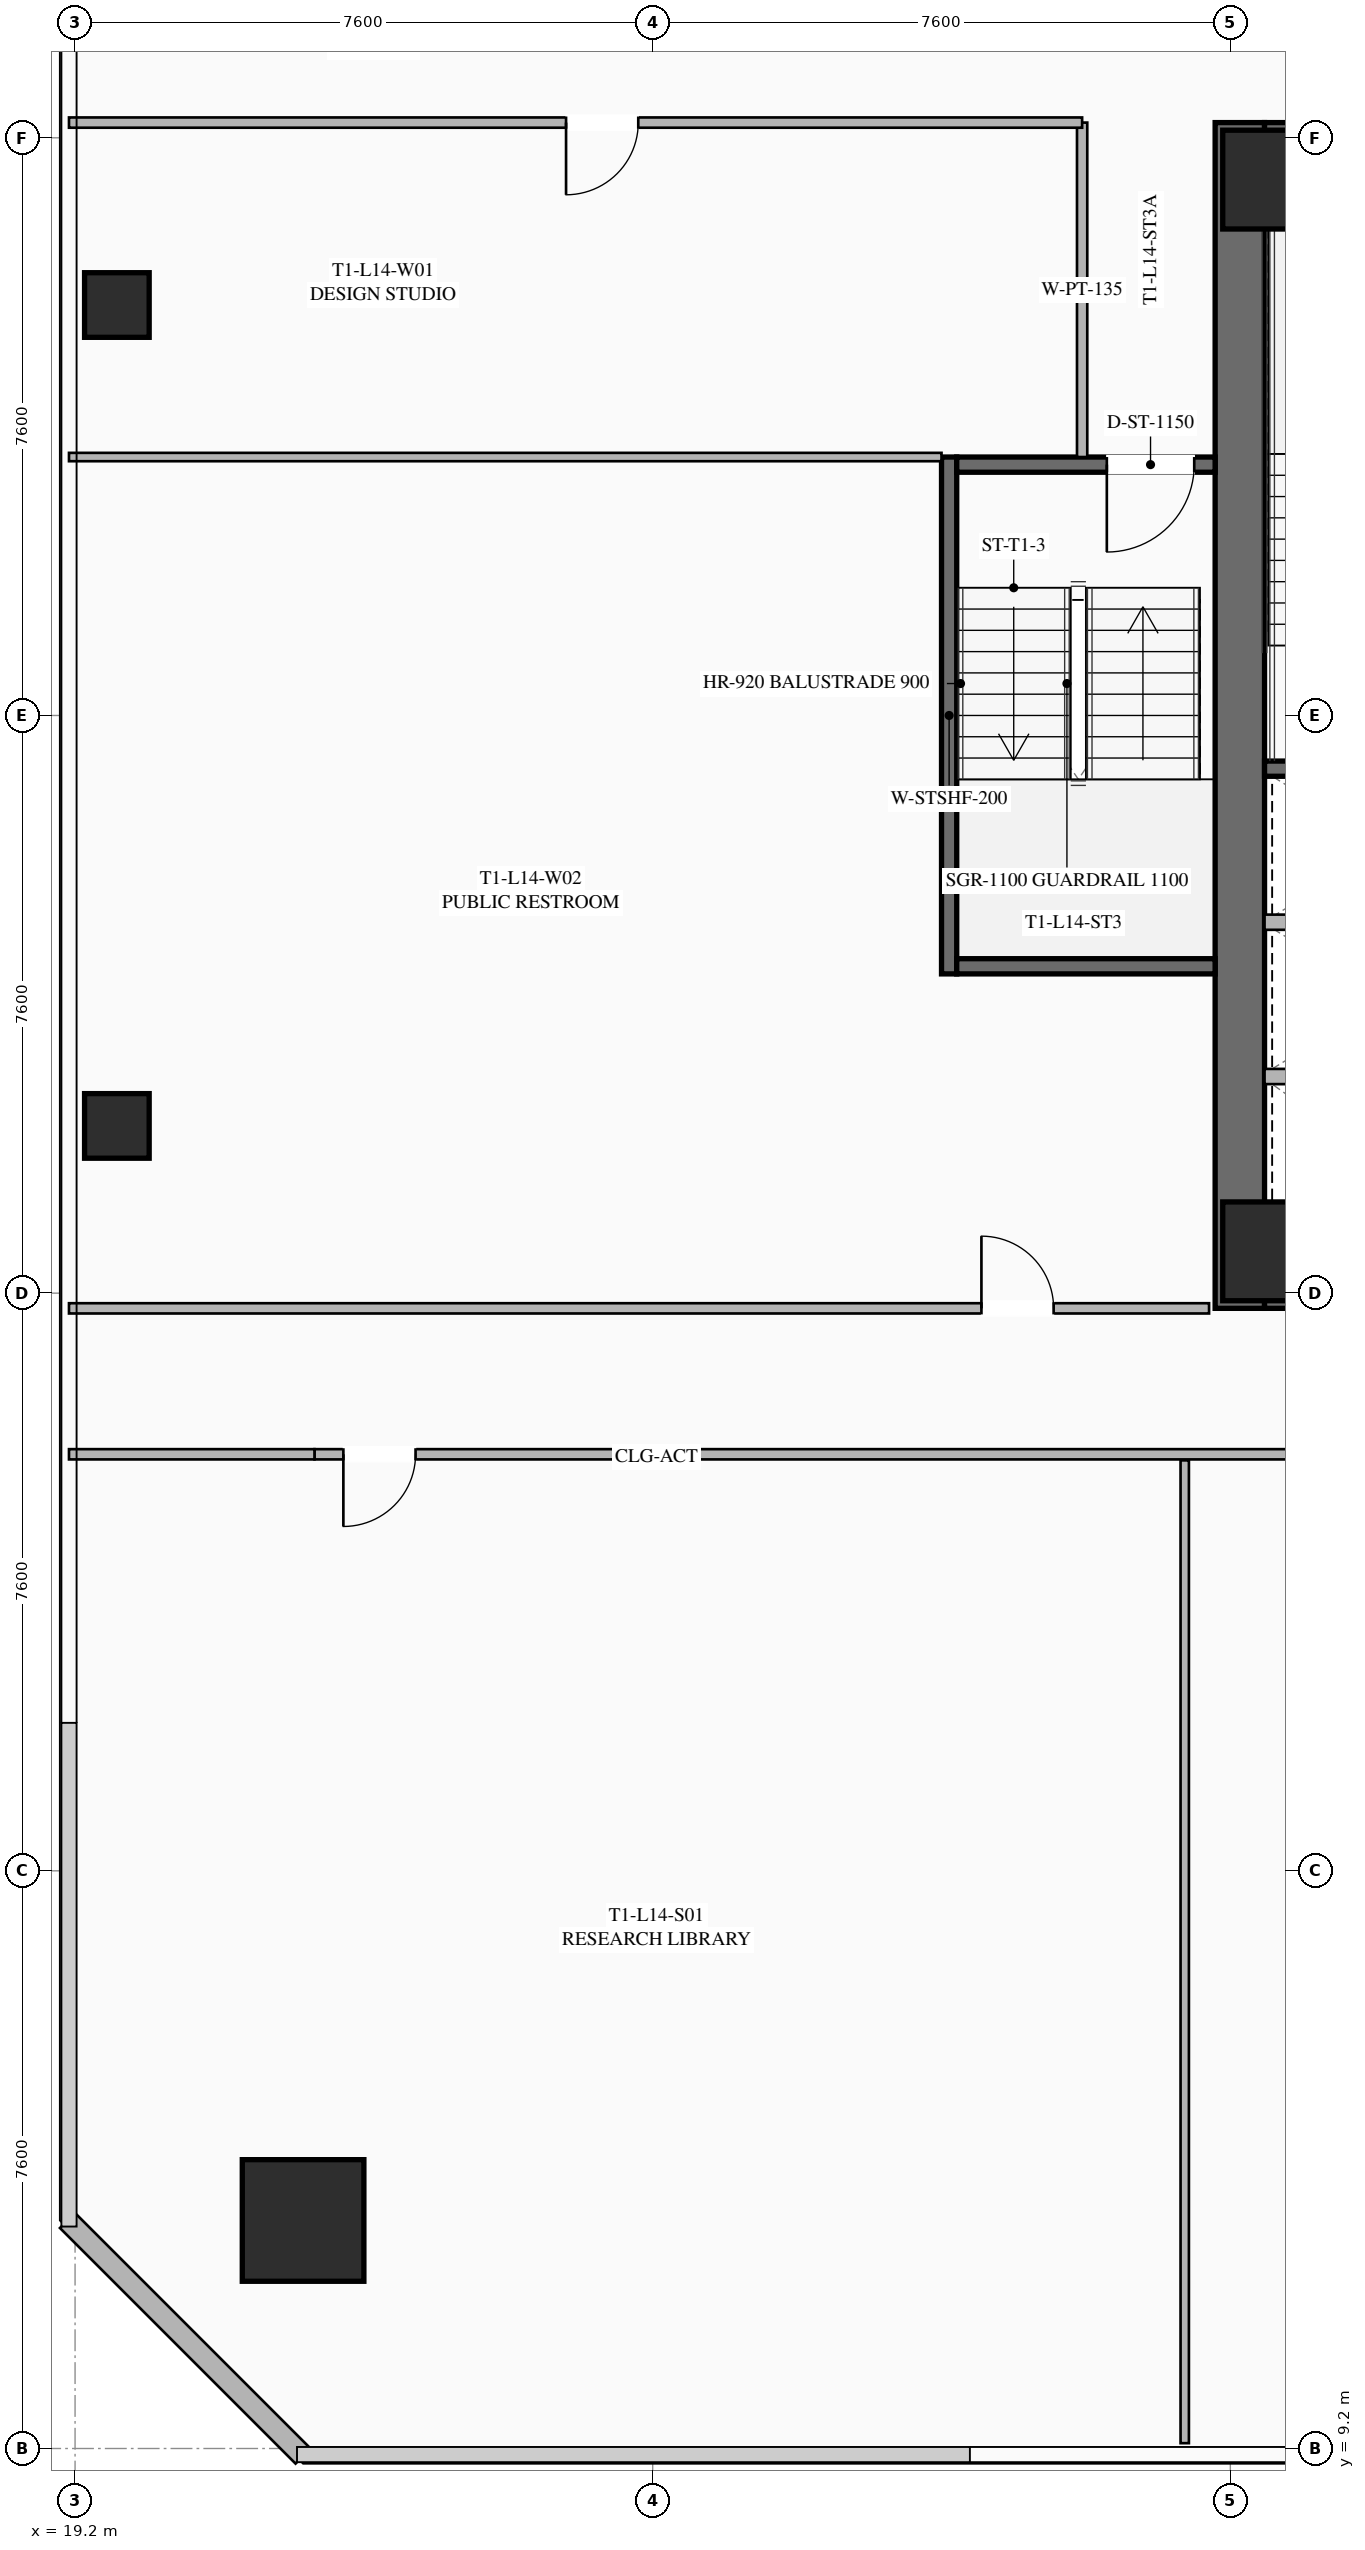
"""IFC4 building model, lengths in metres.
Left out: names, types, materials, properties, quantities, classifications, styles, units other than length and angle.
Written with IfcOpenShell. Run it as: python <this file> out.ifc"""

import sys

from ifc_helpers import new_model, si_unit, direction, frame, frame_2d, origin, origin_2d, place, context, subcontext, project, spatial, rectangle, hollow_rectangle, extrude, element, fill, save


model = new_model("IFC4")
c1 = context("Model", 3, precision=1e-05, world=origin(), true_north=direction((0.0, 1.0)))
c2 = subcontext(c1, "Body", "Model", "MODEL_VIEW")
j1 = project(units=[si_unit("LENGTHUNIT", "METRE"), si_unit("PLANEANGLEUNIT", "RADIAN")], contexts=[c1])
p1 = place(None, origin())
s1 = spatial("IfcSite", under=j1, at=p1, CompositionType="ELEMENT")
p2 = place(p1, origin())
s2 = spatial("IfcBuilding", under=s1, at=p2, CompositionType="ELEMENT")
p3 = place(p2, frame((0.0, 0.0, 56.55)))
s3 = spatial("IfcBuildingStorey", under=s2, at=p3, CompositionType="ELEMENT", Elevation=56.55)
p4 = place(p3, frame((34.525, 24.2, 0.0), z_axis=(0.0, 0.0, 1.0), x_axis=(0.0, 1.0, 0.0)))
e1 = element("IfcWall", 1, at=p4, inside=s3, PredefinedType="SHEAR", context=c2, shape_type="SweptSolid", body=[
    extrude(rectangle(XDim=15.6, YDim=0.65, at=frame_2d((7.8, 0.0))), origin(), (0.0, 0.0, 1.0), 3.55),
])
p5 = place(p3, frame((49.15, 24.525, 0.0), z_axis=(0.0, 0.0, 1.0), x_axis=(-1.0, 0.0, 0.0)))
e2 = element("IfcWall", 2, at=p5, inside=s3, PredefinedType="SHEAR", context=c2, shape_type="SweptSolid", body=[
    extrude(rectangle(XDim=14.3, YDim=0.65, at=frame_2d((7.15, 0.0))), origin(), (0.0, 0.0, 1.0), 3.55),
])
p6 = place(p5, frame((8.85, 0.0, 0.0)))
e3 = element("IfcOpeningElement", 3, at=p6, cuts=e2, PredefinedType="OPENING", context=c2, shape_type="SweptSolid", body=[
    extrude(rectangle(XDim=1.25, YDim=2.25, at=frame_2d((0.625, 1.125))), frame((0.0, 0.335, 0.0), z_axis=(0.0, -1.0, 0.0), x_axis=(1.0, 0.0, 0.0)), (0.0, 0.0, 1.0), 0.67),
])
p7 = place(p5, frame((3.8, 0.0, 0.0)))
e4 = element("IfcOpeningElement", 4, at=p7, cuts=e2, PredefinedType="OPENING", context=c2, shape_type="SweptSolid", body=[
    extrude(rectangle(XDim=1.25, YDim=2.25, at=frame_2d((0.625, 1.125))), frame((0.0, 0.335, 0.0), z_axis=(0.0, -1.0, 0.0), x_axis=(1.0, 0.0, 0.0)), (0.0, 0.0, 1.0), 0.67),
])
p8 = place(p3, frame((34.85, 39.475, 0.0), z_axis=(0.0, 0.0, 1.0), x_axis=(1.0, 0.0, 0.0)))
e5 = element("IfcWall", 5, at=p8, inside=s3, PredefinedType="SHEAR", context=c2, shape_type="SweptSolid", body=[
    extrude(rectangle(XDim=14.3, YDim=0.65, at=frame_2d((7.15, 0.0))), origin(), (0.0, 0.0, 1.0), 3.55),
])
p9 = place(p8, frame((4.2, 0.0, 0.0)))
e6 = element("IfcOpeningElement", 6, at=p9, cuts=e5, PredefinedType="OPENING", context=c2, shape_type="SweptSolid", body=[
    extrude(rectangle(XDim=1.25, YDim=2.25, at=frame_2d((0.625, 1.125))), frame((0.0, 0.335, 0.0), z_axis=(0.0, -1.0, 0.0), x_axis=(1.0, 0.0, 0.0)), (0.0, 0.0, 1.0), 0.67),
])
p10 = place(p8, frame((9.25, 0.0, 0.0)))
e7 = element("IfcOpeningElement", 7, at=p10, cuts=e5, PredefinedType="OPENING", context=c2, shape_type="SweptSolid", body=[
    extrude(rectangle(XDim=1.25, YDim=2.25, at=frame_2d((0.625, 1.125))), frame((0.0, 0.335, 0.0), z_axis=(0.0, -1.0, 0.0), x_axis=(1.0, 0.0, 0.0)), (0.0, 0.0, 1.0), 0.67),
])
for number, where, z_axis, x_axis in (
    (8, (34.95, 24.95, 0.0), (0.0, 0.0, 1.0), (1.0, 0.0, 0.0)),
    (9, (34.95, 39.05, 0.0), (0.0, 0.0, 1.0), (1.0, 0.0, 0.0)),
):
    element("IfcColumn", number, at=place(p3, frame(where, z_axis=z_axis, x_axis=x_axis)), inside=s3, PredefinedType="COLUMN", context=c2, shape_type="SweptSolid", body=[
        extrude(hollow_rectangle(XDim=1.3, YDim=1.3, WallThickness=0.05, at=origin_2d()), origin(), (0.0, 0.0, 1.0), 3.35),
    ])
p11 = place(p3, frame((22.2, 12.2, 0.0), z_axis=(0.0, 0.0, 1.0), x_axis=(1.0, 0.0, 0.0)))
e10 = element("IfcColumn", 10, at=p11, inside=s3, PredefinedType="COLUMN", context=c2, shape_type="SweptSolid", body=[
    extrude(hollow_rectangle(XDim=1.6, YDim=1.6, WallThickness=0.06, at=origin_2d()), origin(), (0.0, 0.0, 1.0), 3.35),
])
for number, where, z_axis, x_axis in (
    (11, (19.75, 37.4, 0.0), (0.0, 0.0, 1.0), (1.0, 0.0, 0.0)),
    (12, (19.75, 26.6, 0.0), (0.0, 0.0, 1.0), (1.0, 0.0, 0.0)),
):
    element("IfcColumn", number, at=place(p3, frame(where, z_axis=z_axis, x_axis=x_axis)), inside=s3, PredefinedType="COLUMN", context=c2, shape_type="SweptSolid", body=[
        extrude(hollow_rectangle(XDim=0.85, YDim=0.85, WallThickness=0.035, at=origin_2d()), origin(), (0.0, 0.0, 1.0), 3.35),
    ])
p12 = place(p3, frame((22.2, 9.1, 0.0), z_axis=(0.0, 0.0, 1.0), x_axis=(-0.707106781187, 0.707106781187, 0.0)))
e13 = element("IfcWall", 13, at=p12, inside=s3, PredefinedType="SOLIDWALL", context=c2, shape_type="SweptSolid", body=[
    extrude(rectangle(XDim=4.384, YDim=0.28, at=frame_2d((2.192, 0.0))), origin(), (0.0, 0.0, 1.0), 3.35),
])
for number, where, z_axis, x_axis in (
    (14, (34.85, 31.3, 0.0), (0.0, 0.0, 1.0), (1.0, 0.0, 0.0)),
    (15, (34.85, 38.7, 0.0), (0.0, 0.0, 1.0), (1.0, 0.0, 0.0)),
):
    element("IfcWall", number, at=place(p3, frame(where, z_axis=z_axis, x_axis=x_axis)), inside=s3, PredefinedType="SHEAR", context=c2, shape_type="SweptSolid", body=[
        extrude(rectangle(XDim=3.45, YDim=0.2, at=frame_2d((1.725, 0.0))), origin(), (0.0, 0.0, 1.0), 3.35),
    ])
for number, where, z_axis, x_axis in (
    (16, (34.85, 27.25, 0.0), (0.0, 0.0, 1.0), (1.0, 0.0, 0.0)),
    (17, (34.85, 29.28, 0.0), (0.0, 0.0, 1.0), (1.0, 0.0, 0.0)),
):
    element("IfcWall", number, at=place(p3, frame(where, z_axis=z_axis, x_axis=x_axis)), inside=s3, PredefinedType="SOLIDWALL", context=c2, shape_type="SweptSolid", body=[
        extrude(rectangle(XDim=3.1, YDim=0.2, at=frame_2d((1.55, 0.0))), origin(), (0.0, 0.0, 1.0), 3.35),
    ])
p13 = place(p3, frame((30.7, 28.6, 0.0), z_axis=(0.0, 0.0, 1.0), x_axis=(0.0, 1.0, 0.0)))
e18 = element("IfcWall", 18, at=p13, inside=s3, PredefinedType="SHEAR", context=c2, shape_type="SweptSolid", body=[
    extrude(rectangle(XDim=6.8, YDim=0.2, at=frame_2d((3.4, 0.0))), origin(), (0.0, 0.0, 1.0), 3.35),
])
p14 = place(p3, frame((34.2, 35.3, 0.0), z_axis=(0.0, 0.0, 1.0), x_axis=(-1.0, 0.0, 0.0)))
e19 = element("IfcWall", 19, at=p14, inside=s3, PredefinedType="SHEAR", context=c2, shape_type="SweptSolid", body=[
    extrude(rectangle(XDim=3.4, YDim=0.2, at=frame_2d((1.7, 0.0))), origin(), (0.0, 0.0, 1.0), 3.35),
])
p15 = place(p14, frame((0.275, 0.0, 0.0)))
e20 = element("IfcOpeningElement", 20, at=p15, cuts=e19, PredefinedType="OPENING", context=c2, shape_type="SweptSolid", body=[
    extrude(rectangle(XDim=1.15, YDim=2.2, at=frame_2d((0.575, 1.1))), frame((0.0, 0.11, 0.0), z_axis=(0.0, -1.0, 0.0), x_axis=(1.0, 0.0, 0.0)), (0.0, 0.0, 1.0), 0.22),
])
p16 = place(p3, frame((30.8, 28.7, 0.0), z_axis=(0.0, 0.0, 1.0), x_axis=(1.0, 0.0, 0.0)))
e21 = element("IfcWall", 21, at=p16, inside=s3, PredefinedType="SHEAR", context=c2, shape_type="SweptSolid", body=[
    extrude(rectangle(XDim=3.4, YDim=0.2, at=frame_2d((1.7, 0.0))), origin(), (0.0, 0.0, 1.0), 3.35),
])
p17 = place(p3, frame((32.45, 35.4, 0.0), z_axis=(0.0, 0.0, 1.0), x_axis=(0.0, 1.0, 0.0)))
e22 = element("IfcWall", 22, at=p17, inside=s3, PredefinedType="PARTITIONING", context=c2, shape_type="SweptSolid", body=[
    extrude(rectangle(XDim=4.4, YDim=0.135, at=frame_2d((2.2, 0.0))), origin(), (0.0, 0.0, 1.0), 2.703),
])
p18 = place(p3, frame((52.95, 22.28, 0.0), z_axis=(0.0, 0.0, 1.0), x_axis=(-1.0, 0.0, 0.0)))
e23 = element("IfcWall", 23, at=p18, inside=s3, PredefinedType="PARTITIONING", context=c2, shape_type="SweptSolid", body=[
    extrude(rectangle(XDim=30.6, YDim=0.135, at=frame_2d((15.3, 0.0))), origin(), (0.0, 0.0, 1.0), 2.703),
])
p19 = place(p18, frame((29.27, 0.0, 0.0)))
e24 = element("IfcOpeningElement", 24, at=p19, cuts=e23, PredefinedType="OPENING", context=c2, shape_type="SweptSolid", body=[
    extrude(rectangle(XDim=0.95, YDim=2.05, at=frame_2d((0.475, 1.025))), frame((0.0, 0.077, 0.0), z_axis=(0.0, -1.0, 0.0), x_axis=(1.0, 0.0, 0.0)), (0.0, 0.0, 1.0), 0.155),
])
p20 = place(p18, frame((10.268, 0.0, 0.0)))
e25 = element("IfcOpeningElement", 25, at=p20, cuts=e23, PredefinedType="OPENING", context=c2, shape_type="SweptSolid", body=[
    extrude(rectangle(XDim=0.95, YDim=2.05, at=frame_2d((0.475, 1.025))), frame((0.0, 0.077, 0.0), z_axis=(0.0, -1.0, 0.0), x_axis=(1.0, 0.0, 0.0)), (0.0, 0.0, 1.0), 0.155),
])
p21 = place(p18, frame((0.38, 0.0, 0.0)))
e26 = element("IfcOpeningElement", 26, at=p21, cuts=e23, PredefinedType="OPENING", context=c2, shape_type="SweptSolid", body=[
    extrude(rectangle(XDim=0.95, YDim=2.05, at=frame_2d((0.475, 1.025))), frame((0.0, 0.077, 0.0), z_axis=(0.0, -1.0, 0.0), x_axis=(1.0, 0.0, 0.0)), (0.0, 0.0, 1.0), 0.155),
])
p22 = place(p3, frame((19.12, 22.28, 0.0), z_axis=(0.0, 0.0, 1.0), x_axis=(1.0, 0.0, 0.0)))
e27 = element("IfcWall", 27, at=p22, inside=s3, PredefinedType="PARTITIONING", context=c2, shape_type="SweptSolid", body=[
    extrude(rectangle(XDim=3.23, YDim=0.135, at=frame_2d((1.615, 0.0))), origin(), (0.0, 0.0, 1.0), 2.703),
])
p23 = place(p3, frame((33.8, 9.27, 0.0), z_axis=(0.0, 0.0, 1.0), x_axis=(0.0, 1.0, 0.0)))
e28 = element("IfcWall", 28, at=p23, inside=s3, PredefinedType="PARTITIONING", context=c2, shape_type="SweptSolid", body=[
    extrude(rectangle(XDim=12.93, YDim=0.11, at=frame_2d((6.465, 0.0))), origin(), (0.0, 0.0, 1.0), 2.703),
])
p24 = place(p3, frame((32.45, 39.8, 0.0), z_axis=(0.0, 0.0, 1.0), x_axis=(-1.0, 0.0, 0.0)))
e29 = element("IfcWall", 29, at=p24, inside=s3, PredefinedType="PARTITIONING", context=c2, shape_type="SweptSolid", body=[
    extrude(rectangle(XDim=13.33, YDim=0.135, at=frame_2d((6.665, 0.0))), origin(), (0.0, 0.0, 1.0), 2.703),
])
p25 = place(p24, frame((5.84, 0.0, 0.0)))
e30 = element("IfcOpeningElement", 30, at=p25, cuts=e29, PredefinedType="OPENING", context=c2, shape_type="SweptSolid", body=[
    extrude(rectangle(XDim=0.95, YDim=2.05, at=frame_2d((0.475, 1.025))), frame((0.0, 0.077, 0.0), z_axis=(0.0, -1.0, 0.0), x_axis=(1.0, 0.0, 0.0)), (0.0, 0.0, 1.0), 0.155),
])
p26 = place(p3, frame((19.12, 24.2, 0.0), z_axis=(0.0, 0.0, 1.0), x_axis=(1.0, 0.0, 0.0)))
e31 = element("IfcWall", 31, at=p26, inside=s3, PredefinedType="PARTITIONING", context=c2, shape_type="SweptSolid", body=[
    extrude(rectangle(XDim=15.0, YDim=0.135, at=frame_2d((7.5, 0.0))), origin(), (0.0, 0.0, 1.0), 2.703),
])
p27 = place(p26, frame((12.005, 0.0, 0.0)))
e32 = element("IfcOpeningElement", 32, at=p27, cuts=e31, PredefinedType="OPENING", context=c2, shape_type="SweptSolid", body=[
    extrude(rectangle(XDim=0.95, YDim=2.05, at=frame_2d((0.475, 1.025))), frame((0.0, 0.077, 0.0), z_axis=(0.0, -1.0, 0.0), x_axis=(1.0, 0.0, 0.0)), (0.0, 0.0, 1.0), 0.155),
])
p28 = place(p3, frame((30.6, 35.4, 0.0), z_axis=(0.0, 0.0, 1.0), x_axis=(-1.0, 0.0, 0.0)))
e33 = element("IfcWall", 33, at=p28, inside=s3, PredefinedType="PARTITIONING", context=c2, shape_type="SweptSolid", body=[
    extrude(rectangle(XDim=11.48, YDim=0.11, at=frame_2d((5.74, 0.0))), origin(), (0.0, 0.0, 1.0), 2.703),
])
p29 = place(p15, origin())
e34 = element("IfcDoor", 34, at=p29, inside=s3, OperationType="SINGLE_SWING_RIGHT", PredefinedType="DOOR", context=c2, shape_type="SweptSolid", body=[
    extrude(rectangle(XDim=1.15, YDim=2.2, at=frame_2d((0.575, 1.1))), frame((0.0, 0.025, 0.0), z_axis=(0.0, -1.0, 0.0), x_axis=(1.0, 0.0, 0.0)), (0.0, 0.0, 1.0), 0.05),
])
fill(e20, e34)
p30 = place(p19, origin())
e35 = element("IfcDoor", 35, at=p30, inside=s3, OperationType="SINGLE_SWING_RIGHT", PredefinedType="DOOR", context=c2, shape_type="SweptSolid", body=[
    extrude(rectangle(XDim=0.95, YDim=2.05, at=frame_2d((0.475, 1.025))), frame((0.0, 0.025, 0.0), z_axis=(0.0, -1.0, 0.0), x_axis=(1.0, 0.0, 0.0)), (0.0, 0.0, 1.0), 0.05),
])
fill(e24, e35)
p31 = place(p25, origin())
e36 = element("IfcDoor", 36, at=p31, inside=s3, OperationType="SINGLE_SWING_RIGHT", PredefinedType="DOOR", context=c2, shape_type="SweptSolid", body=[
    extrude(rectangle(XDim=0.95, YDim=2.05, at=frame_2d((0.475, 1.025))), frame((0.0, 0.025, 0.0), z_axis=(0.0, -1.0, 0.0), x_axis=(1.0, 0.0, 0.0)), (0.0, 0.0, 1.0), 0.05),
])
fill(e30, e36)
p32 = place(p27, origin())
e37 = element("IfcDoor", 37, at=p32, inside=s3, OperationType="SINGLE_SWING_LEFT", PredefinedType="DOOR", context=c2, shape_type="SweptSolid", body=[
    extrude(rectangle(XDim=0.95, YDim=2.05, at=frame_2d((0.475, 1.025))), frame((0.0, 0.025, 0.0), z_axis=(0.0, -1.0, 0.0), x_axis=(1.0, 0.0, 0.0)), (0.0, 0.0, 1.0), 0.05),
])
fill(e32, e37)
save(model, sys.argv[1])
